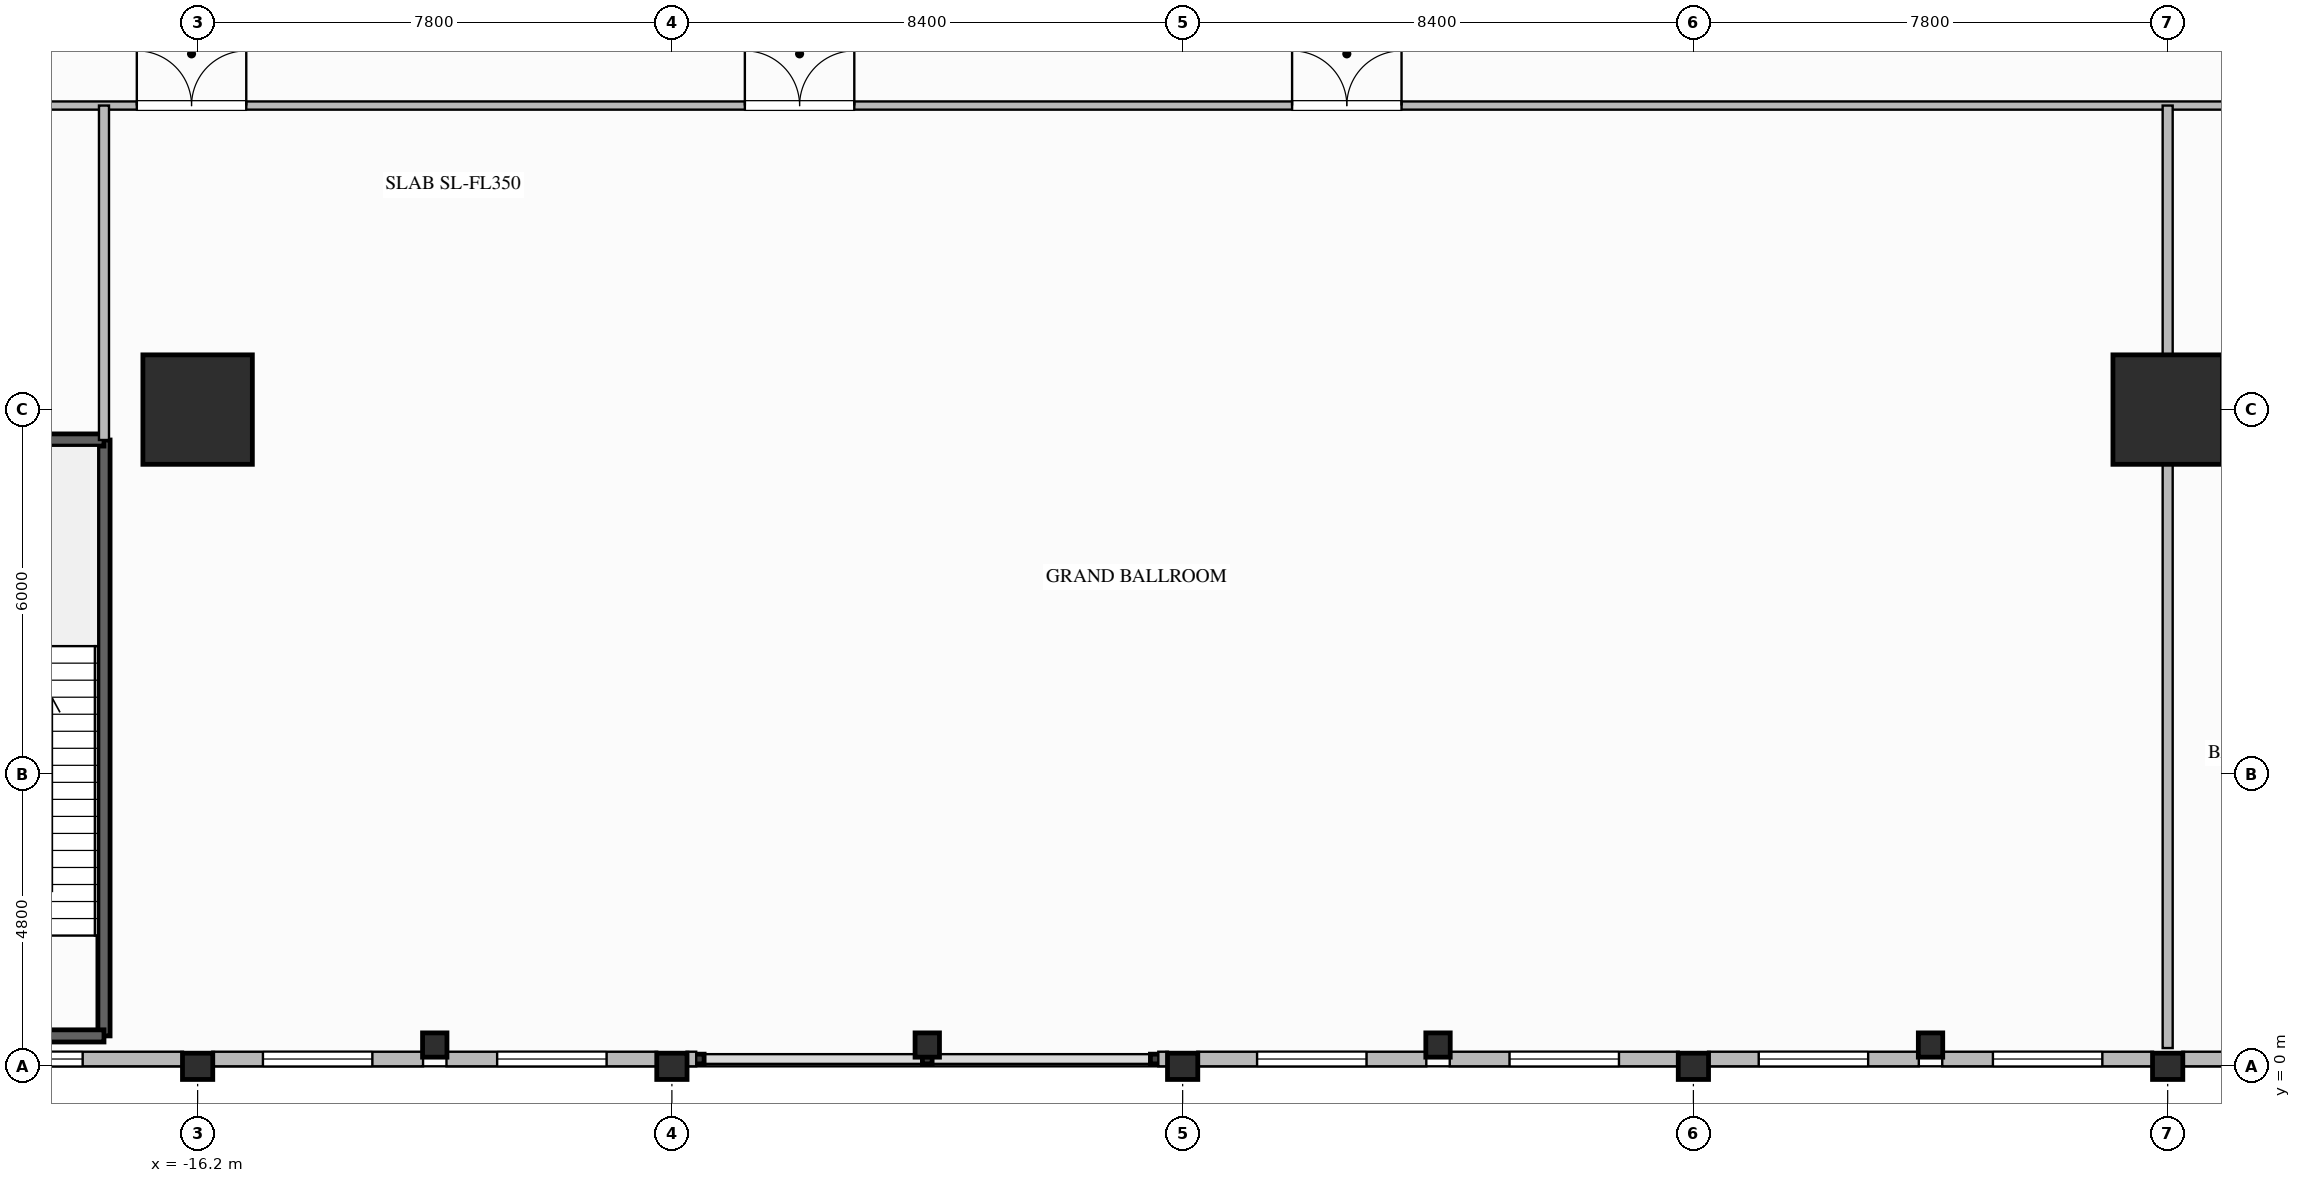
"""IFC4 building model, lengths in metres.
Left out: names, types, materials, properties, quantities, classifications, styles, units other than length and angle.
Written with IfcOpenShell. Run it as: python <this file> out.ifc"""

import sys

from ifc_helpers import new_model, si_unit, direction, frame, frame_2d, origin, origin_2d, place, context, subcontext, project, spatial, rectangle, i_section, extrude, element, fill, save


model = new_model("IFC4")
c1 = context("Model", 3, precision=1e-05, world=origin(), true_north=direction((0.0, 1.0)))
c2 = subcontext(c1, "Body", "Model", "MODEL_VIEW")
j1 = project(units=[si_unit("LENGTHUNIT", "METRE"), si_unit("PLANEANGLEUNIT", "RADIAN")], contexts=[c1])
p1 = place(None, origin())
s1 = spatial("IfcSite", under=j1, at=p1, CompositionType="ELEMENT")
p2 = place(p1, origin())
s2 = spatial("IfcBuilding", under=s1, at=p2, CompositionType="ELEMENT")
p3 = place(p2, frame((0.0, 0.0, 10.8)))
s3 = spatial("IfcBuildingStorey", under=s2, at=p3, CompositionType="ELEMENT", Elevation=10.8)
for number, where, z_axis, x_axis in (
    (1, (-16.2, 10.8, 0.0), (0.0, 0.0, 1.0), (1.0, 0.0, 0.0)),
    (2, (16.2, 10.8, 0.0), (0.0, 0.0, 1.0), (1.0, 0.0, 0.0)),
):
    element("IfcColumn", number, at=place(p3, frame(where, z_axis=z_axis, x_axis=x_axis)), inside=s3, PredefinedType="COLUMN", context=c2, shape_type="SweptSolid", body=[
        extrude(rectangle(XDim=1.8, YDim=1.8, at=origin_2d()), origin(), (0.0, 0.0, 1.0), 6.4),
    ])
for number, where, z_axis, x_axis in (
    (3, (-16.2, 0.0, 0.0), (0.0, 0.0, 1.0), (0.0, 1.0, 0.0)),
    (4, (-8.4, 0.0, 0.0), (0.0, 0.0, 1.0), (0.0, 1.0, 0.0)),
    (5, (0.0, 0.0, 0.0), (0.0, 0.0, 1.0), (0.0, 1.0, 0.0)),
    (6, (8.4, 0.0, 0.0), (0.0, 0.0, 1.0), (0.0, 1.0, 0.0)),
    (7, (16.2, 0.0, 0.0), (0.0, 0.0, 1.0), (0.0, 1.0, 0.0)),
):
    element("IfcColumn", number, at=place(p3, frame(where, z_axis=z_axis, x_axis=x_axis)), inside=s3, PredefinedType="COLUMN", context=c2, shape_type="SweptSolid", body=[
        extrude(i_section(OverallWidth=0.432, OverallDepth=0.498, WebThickness=0.056, FlangeThickness=0.089, FilletRadius=0.03, at=origin_2d()), origin(), (0.0, 0.0, 1.0), 6.4),
    ])
for number, where, z_axis, x_axis in (
    (8, (-12.3, 0.35, 0.0), (0.0, 0.0, 1.0), (1.0, 0.0, 0.0)),
    (9, (-4.2, 0.35, 0.0), (0.0, 0.0, 1.0), (1.0, 0.0, 0.0)),
    (10, (4.2, 0.35, 0.0), (0.0, 0.0, 1.0), (1.0, 0.0, 0.0)),
    (11, (12.3, 0.35, 0.0), (0.0, 0.0, 1.0), (1.0, 0.0, 0.0)),
):
    element("IfcColumn", number, at=place(p3, frame(where, z_axis=z_axis, x_axis=x_axis)), inside=s3, PredefinedType="COLUMN", context=c2, shape_type="SweptSolid", body=[
        extrude(i_section(OverallWidth=0.401, OverallDepth=0.399, WebThickness=0.025, FlangeThickness=0.04, FilletRadius=0.025, at=origin_2d()), origin(), (0.0, 0.0, 1.0), 6.4),
    ])
p4 = place(p3, frame((-16.441, 0.12, 0.0), z_axis=(0.0, 0.0, 1.0), x_axis=(-1.0, 0.0, 0.0)))
e12 = element("IfcWall", 12, at=p4, inside=s3, PredefinedType="STANDARD", context=c2, shape_type="SweptSolid", body=[
    extrude(rectangle(XDim=5.518, YDim=0.24, at=frame_2d((2.759, 0.0))), origin(), (0.0, 0.0, 1.0), 5.404),
])
p5 = place(p4, frame((1.65, 0.0, 0.65)))
e13 = element("IfcOpeningElement", 13, at=p5, cuts=e12, PredefinedType="OPENING", context=c2, shape_type="SweptSolid", body=[
    extrude(rectangle(XDim=1.8, YDim=2.2, at=frame_2d((0.9, 1.1))), frame((0.0, 0.13, 0.0), z_axis=(0.0, -1.0, 0.0), x_axis=(1.0, 0.0, 0.0)), (0.0, 0.0, 1.0), 0.26),
])
p6 = place(p3, frame((-12.493, 0.12, 0.0), z_axis=(0.0, 0.0, 1.0), x_axis=(-1.0, 0.0, 0.0)))
e14 = element("IfcWall", 14, at=p6, inside=s3, PredefinedType="STANDARD", context=c2, shape_type="SweptSolid", body=[
    extrude(rectangle(XDim=3.466, YDim=0.24, at=frame_2d((1.733, 0.0))), origin(), (0.0, 0.0, 1.0), 5.404),
])
p7 = place(p6, frame((0.833, 0.0, 0.65)))
e15 = element("IfcOpeningElement", 15, at=p7, cuts=e14, PredefinedType="OPENING", context=c2, shape_type="SweptSolid", body=[
    extrude(rectangle(XDim=1.8, YDim=2.2, at=frame_2d((0.9, 1.1))), frame((0.0, 0.13, 0.0), z_axis=(0.0, -1.0, 0.0), x_axis=(1.0, 0.0, 0.0)), (0.0, 0.0, 1.0), 0.26),
])
p8 = place(p3, frame((-8.641, 0.12, 0.0), z_axis=(0.0, 0.0, 1.0), x_axis=(-1.0, 0.0, 0.0)))
e16 = element("IfcWall", 16, at=p8, inside=s3, PredefinedType="STANDARD", context=c2, shape_type="SweptSolid", body=[
    extrude(rectangle(XDim=3.467, YDim=0.24, at=frame_2d((1.733, 0.0))), origin(), (0.0, 0.0, 1.0), 5.404),
])
p9 = place(p8, frame((0.833, 0.0, 0.65)))
e17 = element("IfcOpeningElement", 17, at=p9, cuts=e16, PredefinedType="OPENING", context=c2, shape_type="SweptSolid", body=[
    extrude(rectangle(XDim=1.8, YDim=2.2, at=frame_2d((0.9, 1.1))), frame((0.0, 0.13, 0.0), z_axis=(0.0, -1.0, 0.0), x_axis=(1.0, 0.0, 0.0)), (0.0, 0.0, 1.0), 0.26),
])
p10 = place(p3, frame((-8.0, 0.12, 0.0), z_axis=(0.0, 0.0, 1.0), x_axis=(-1.0, 0.0, 0.0)))
e18 = element("IfcWall", 18, at=p10, inside=s3, PredefinedType="STANDARD", context=c2, shape_type="SweptSolid", body=[
    extrude(rectangle(XDim=0.159, YDim=0.24, at=frame_2d((0.08, 0.0))), origin(), (0.0, 0.0, 1.0), 6.1),
])
p11 = place(p3, frame((-0.241, 0.12, 0.0), z_axis=(0.0, 0.0, 1.0), x_axis=(-1.0, 0.0, 0.0)))
e19 = element("IfcWall", 19, at=p11, inside=s3, PredefinedType="STANDARD", context=c2, shape_type="SweptSolid", body=[
    extrude(rectangle(XDim=0.159, YDim=0.24, at=frame_2d((0.08, 0.0))), origin(), (0.0, 0.0, 1.0), 6.1),
])
p12 = place(p3, frame((4.007, 0.12, 0.0), z_axis=(0.0, 0.0, 1.0), x_axis=(-1.0, 0.0, 0.0)))
e20 = element("IfcWall", 20, at=p12, inside=s3, PredefinedType="STANDARD", context=c2, shape_type="SweptSolid", body=[
    extrude(rectangle(XDim=3.766, YDim=0.24, at=frame_2d((1.883, 0.0))), origin(), (0.0, 0.0, 1.0), 5.404),
])
p13 = place(p12, frame((0.983, 0.0, 0.65)))
e21 = element("IfcOpeningElement", 21, at=p13, cuts=e20, PredefinedType="OPENING", context=c2, shape_type="SweptSolid", body=[
    extrude(rectangle(XDim=1.8, YDim=2.2, at=frame_2d((0.9, 1.1))), frame((0.0, 0.13, 0.0), z_axis=(0.0, -1.0, 0.0), x_axis=(1.0, 0.0, 0.0)), (0.0, 0.0, 1.0), 0.26),
])
p14 = place(p3, frame((8.159, 0.12, 0.0), z_axis=(0.0, 0.0, 1.0), x_axis=(-1.0, 0.0, 0.0)))
e22 = element("IfcWall", 22, at=p14, inside=s3, PredefinedType="STANDARD", context=c2, shape_type="SweptSolid", body=[
    extrude(rectangle(XDim=3.767, YDim=0.24, at=frame_2d((1.883, 0.0))), origin(), (0.0, 0.0, 1.0), 5.404),
])
p15 = place(p14, frame((0.983, 0.0, 0.65)))
e23 = element("IfcOpeningElement", 23, at=p15, cuts=e22, PredefinedType="OPENING", context=c2, shape_type="SweptSolid", body=[
    extrude(rectangle(XDim=1.8, YDim=2.2, at=frame_2d((0.9, 1.1))), frame((0.0, 0.13, 0.0), z_axis=(0.0, -1.0, 0.0), x_axis=(1.0, 0.0, 0.0)), (0.0, 0.0, 1.0), 0.26),
])
p16 = place(p3, frame((12.107, 0.12, 0.0), z_axis=(0.0, 0.0, 1.0), x_axis=(-1.0, 0.0, 0.0)))
e24 = element("IfcWall", 24, at=p16, inside=s3, PredefinedType="STANDARD", context=c2, shape_type="SweptSolid", body=[
    extrude(rectangle(XDim=3.467, YDim=0.24, at=frame_2d((1.733, 0.0))), origin(), (0.0, 0.0, 1.0), 5.404),
])
p17 = place(p16, frame((0.833, 0.0, 0.65)))
e25 = element("IfcOpeningElement", 25, at=p17, cuts=e24, PredefinedType="OPENING", context=c2, shape_type="SweptSolid", body=[
    extrude(rectangle(XDim=1.8, YDim=2.2, at=frame_2d((0.9, 1.1))), frame((0.0, 0.13, 0.0), z_axis=(0.0, -1.0, 0.0), x_axis=(1.0, 0.0, 0.0)), (0.0, 0.0, 1.0), 0.26),
])
p18 = place(p3, frame((15.959, 0.12, 0.0), z_axis=(0.0, 0.0, 1.0), x_axis=(-1.0, 0.0, 0.0)))
e26 = element("IfcWall", 26, at=p18, inside=s3, PredefinedType="STANDARD", context=c2, shape_type="SweptSolid", body=[
    extrude(rectangle(XDim=3.466, YDim=0.24, at=frame_2d((1.733, 0.0))), origin(), (0.0, 0.0, 1.0), 5.404),
])
p19 = place(p18, frame((0.833, 0.0, 0.65)))
e27 = element("IfcOpeningElement", 27, at=p19, cuts=e26, PredefinedType="OPENING", context=c2, shape_type="SweptSolid", body=[
    extrude(rectangle(XDim=1.8, YDim=2.2, at=frame_2d((0.9, 1.1))), frame((0.0, 0.13, 0.0), z_axis=(0.0, -1.0, 0.0), x_axis=(1.0, 0.0, 0.0)), (0.0, 0.0, 1.0), 0.26),
])
p20 = place(p3, frame((19.007, 0.12, 0.0), z_axis=(0.0, 0.0, 1.0), x_axis=(-1.0, 0.0, 0.0)))
e28 = element("IfcWall", 28, at=p20, inside=s3, PredefinedType="STANDARD", context=c2, shape_type="SweptSolid", body=[
    extrude(rectangle(XDim=2.566, YDim=0.24, at=frame_2d((1.283, 0.0))), origin(), (0.0, 0.0, 1.0), 5.404),
])
p21 = place(p3, frame((-17.74, 10.3, 0.0), z_axis=(0.0, 0.0, 1.0), x_axis=(0.0, -1.0, 0.0)))
e29 = element("IfcWall", 29, at=p21, inside=s3, PredefinedType="SOLIDWALL", context=c2, shape_type="SweptSolid", body=[
    extrude(rectangle(XDim=9.8, YDim=0.2, at=frame_2d((4.9, 0.0))), origin(), (0.0, 0.0, 1.0), 6.1),
])
for number, where, z_axis, x_axis in (
    (30, (-21.1, 0.5, 0.0), (0.0, 0.0, 1.0), (1.0, 0.0, 0.0)),
    (31, (-17.74, 10.3, 0.0), (0.0, 0.0, 1.0), (-1.0, 0.0, 0.0)),
):
    element("IfcWall", number, at=place(p3, frame(where, z_axis=z_axis, x_axis=x_axis)), inside=s3, PredefinedType="SOLIDWALL", context=c2, shape_type="SweptSolid", body=[
        extrude(rectangle(XDim=3.36, YDim=0.2, at=frame_2d((1.68, 0.0))), origin(), (0.0, 0.0, 1.0), 6.1),
    ])
p22 = place(p3, frame((-21.2, 15.8, 0.0), z_axis=(0.0, 0.0, 1.0), x_axis=(1.0, 0.0, 0.0)))
e32 = element("IfcWall", 32, at=p22, inside=s3, PredefinedType="PARTITIONING", context=c2, shape_type="SweptSolid", body=[
    extrude(rectangle(XDim=46.3, YDim=0.135, at=frame_2d((23.15, 0.0))), origin(), (0.0, 0.0, 1.0), 6.1),
])
p23 = place(p22, frame((4.0, 0.0, 0.0)))
e33 = element("IfcOpeningElement", 33, at=p23, cuts=e32, PredefinedType="OPENING", context=c2, shape_type="SweptSolid", body=[
    extrude(rectangle(XDim=1.8, YDim=2.35, at=frame_2d((0.9, 1.175))), frame((0.0, 0.077, 0.0), z_axis=(0.0, -1.0, 0.0), x_axis=(1.0, 0.0, 0.0)), (0.0, 0.0, 1.0), 0.155),
])
p24 = place(p22, frame((14.0, 0.0, 0.0)))
e34 = element("IfcOpeningElement", 34, at=p24, cuts=e32, PredefinedType="OPENING", context=c2, shape_type="SweptSolid", body=[
    extrude(rectangle(XDim=1.8, YDim=2.35, at=frame_2d((0.9, 1.175))), frame((0.0, 0.077, 0.0), z_axis=(0.0, -1.0, 0.0), x_axis=(1.0, 0.0, 0.0)), (0.0, 0.0, 1.0), 0.155),
])
p25 = place(p22, frame((23.0, 0.0, 0.0)))
e35 = element("IfcOpeningElement", 35, at=p25, cuts=e32, PredefinedType="OPENING", context=c2, shape_type="SweptSolid", body=[
    extrude(rectangle(XDim=1.8, YDim=2.35, at=frame_2d((0.9, 1.175))), frame((0.0, 0.077, 0.0), z_axis=(0.0, -1.0, 0.0), x_axis=(1.0, 0.0, 0.0)), (0.0, 0.0, 1.0), 0.155),
])
p26 = place(p22, frame((41.2, 0.0, 0.0)))
e36 = element("IfcOpeningElement", 36, at=p26, cuts=e32, PredefinedType="OPENING", context=c2, shape_type="SweptSolid", body=[
    extrude(rectangle(XDim=1.26, YDim=2.2, at=frame_2d((0.63, 1.1))), frame((0.0, 0.077, 0.0), z_axis=(0.0, -1.0, 0.0), x_axis=(1.0, 0.0, 0.0)), (0.0, 0.0, 1.0), 0.155),
])
p27 = place(p3, frame((-17.74, 10.3, 0.0), z_axis=(0.0, 0.0, 1.0), x_axis=(0.0, 1.0, 0.0)))
e37 = element("IfcWall", 37, at=p27, inside=s3, PredefinedType="PARTITIONING", context=c2, shape_type="SweptSolid", body=[
    extrude(rectangle(XDim=5.5, YDim=0.165, at=frame_2d((2.75, 0.0))), origin(), (0.0, 0.0, 1.0), 6.1),
])
p28 = place(p3, frame((16.2, 0.3, 0.0), z_axis=(0.0, 0.0, 1.0), x_axis=(0.0, 1.0, 0.0)))
e38 = element("IfcWall", 38, at=p28, inside=s3, PredefinedType="PARTITIONING", context=c2, shape_type="SweptSolid", body=[
    extrude(rectangle(XDim=15.5, YDim=0.165, at=frame_2d((7.75, 0.0))), origin(), (0.0, 0.0, 1.0), 5.137),
])
p29 = place(p5, origin())
e39 = element("IfcWindow", 39, at=p29, inside=s3, PartitioningType="SINGLE_PANEL", PredefinedType="WINDOW", context=c2, shape_type="SweptSolid", body=[
    extrude(rectangle(XDim=1.8, YDim=2.2, at=frame_2d((0.9, 1.1))), frame((0.0, 0.03, 0.0), z_axis=(0.0, -1.0, 0.0), x_axis=(1.0, 0.0, 0.0)), (0.0, 0.0, 1.0), 0.06),
])
fill(e13, e39)
p30 = place(p7, origin())
e40 = element("IfcWindow", 40, at=p30, inside=s3, PartitioningType="SINGLE_PANEL", PredefinedType="WINDOW", context=c2, shape_type="SweptSolid", body=[
    extrude(rectangle(XDim=1.8, YDim=2.2, at=frame_2d((0.9, 1.1))), frame((0.0, 0.03, 0.0), z_axis=(0.0, -1.0, 0.0), x_axis=(1.0, 0.0, 0.0)), (0.0, 0.0, 1.0), 0.06),
])
fill(e15, e40)
p31 = place(p9, origin())
e41 = element("IfcWindow", 41, at=p31, inside=s3, PartitioningType="SINGLE_PANEL", PredefinedType="WINDOW", context=c2, shape_type="SweptSolid", body=[
    extrude(rectangle(XDim=1.8, YDim=2.2, at=frame_2d((0.9, 1.1))), frame((0.0, 0.03, 0.0), z_axis=(0.0, -1.0, 0.0), x_axis=(1.0, 0.0, 0.0)), (0.0, 0.0, 1.0), 0.06),
])
fill(e17, e41)
p32 = place(p13, origin())
e42 = element("IfcWindow", 42, at=p32, inside=s3, PartitioningType="SINGLE_PANEL", PredefinedType="WINDOW", context=c2, shape_type="SweptSolid", body=[
    extrude(rectangle(XDim=1.8, YDim=2.2, at=frame_2d((0.9, 1.1))), frame((0.0, 0.03, 0.0), z_axis=(0.0, -1.0, 0.0), x_axis=(1.0, 0.0, 0.0)), (0.0, 0.0, 1.0), 0.06),
])
fill(e21, e42)
p33 = place(p15, origin())
e43 = element("IfcWindow", 43, at=p33, inside=s3, PartitioningType="SINGLE_PANEL", PredefinedType="WINDOW", context=c2, shape_type="SweptSolid", body=[
    extrude(rectangle(XDim=1.8, YDim=2.2, at=frame_2d((0.9, 1.1))), frame((0.0, 0.03, 0.0), z_axis=(0.0, -1.0, 0.0), x_axis=(1.0, 0.0, 0.0)), (0.0, 0.0, 1.0), 0.06),
])
fill(e23, e43)
p34 = place(p17, origin())
e44 = element("IfcWindow", 44, at=p34, inside=s3, PartitioningType="SINGLE_PANEL", PredefinedType="WINDOW", context=c2, shape_type="SweptSolid", body=[
    extrude(rectangle(XDim=1.8, YDim=2.2, at=frame_2d((0.9, 1.1))), frame((0.0, 0.03, 0.0), z_axis=(0.0, -1.0, 0.0), x_axis=(1.0, 0.0, 0.0)), (0.0, 0.0, 1.0), 0.06),
])
fill(e25, e44)
p35 = place(p19, origin())
e45 = element("IfcWindow", 45, at=p35, inside=s3, PartitioningType="SINGLE_PANEL", PredefinedType="WINDOW", context=c2, shape_type="SweptSolid", body=[
    extrude(rectangle(XDim=1.8, YDim=2.2, at=frame_2d((0.9, 1.1))), frame((0.0, 0.03, 0.0), z_axis=(0.0, -1.0, 0.0), x_axis=(1.0, 0.0, 0.0)), (0.0, 0.0, 1.0), 0.06),
])
fill(e27, e45)
p36 = place(p23, origin())
e46 = element("IfcDoor", 46, at=p36, inside=s3, OperationType="DOUBLE_DOOR_SINGLE_SWING", PredefinedType="DOOR", context=c2, shape_type="SweptSolid", body=[
    extrude(rectangle(XDim=1.8, YDim=2.35, at=frame_2d((0.9, 1.175))), frame((0.0, 0.025, 0.0), z_axis=(0.0, -1.0, 0.0), x_axis=(1.0, 0.0, 0.0)), (0.0, 0.0, 1.0), 0.05),
])
fill(e33, e46)
p37 = place(p24, origin())
e47 = element("IfcDoor", 47, at=p37, inside=s3, OperationType="DOUBLE_DOOR_SINGLE_SWING", PredefinedType="DOOR", context=c2, shape_type="SweptSolid", body=[
    extrude(rectangle(XDim=1.8, YDim=2.35, at=frame_2d((0.9, 1.175))), frame((0.0, 0.025, 0.0), z_axis=(0.0, -1.0, 0.0), x_axis=(1.0, 0.0, 0.0)), (0.0, 0.0, 1.0), 0.05),
])
fill(e34, e47)
p38 = place(p25, origin())
e48 = element("IfcDoor", 48, at=p38, inside=s3, OperationType="DOUBLE_DOOR_SINGLE_SWING", PredefinedType="DOOR", context=c2, shape_type="SweptSolid", body=[
    extrude(rectangle(XDim=1.8, YDim=2.35, at=frame_2d((0.9, 1.175))), frame((0.0, 0.025, 0.0), z_axis=(0.0, -1.0, 0.0), x_axis=(1.0, 0.0, 0.0)), (0.0, 0.0, 1.0), 0.05),
])
fill(e35, e48)
save(model, sys.argv[1])
